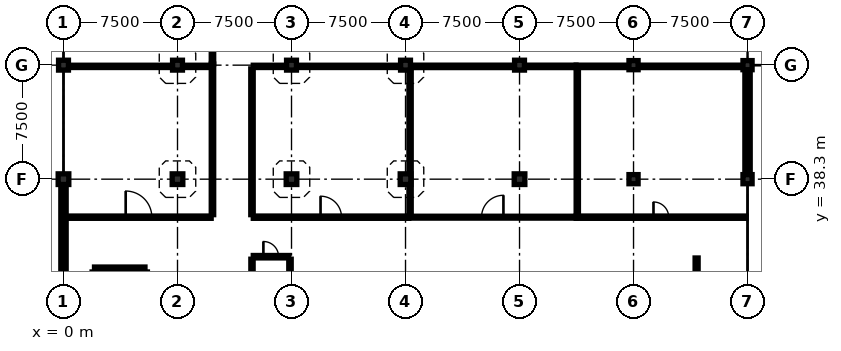
"""IFC4 building model, lengths in metres.
Left out: names, types, materials, properties, quantities, classifications, styles, units other than length and angle.
Written with IfcOpenShell. Run it as: python <this file> out.ifc"""

import sys

from ifc_helpers import new_model, si_unit, direction, frame, frame_2d, origin, origin_2d, place, context, subcontext, project, spatial, rectangle, extrude, element, fill, save


model = new_model("IFC4")
c1 = context("Model", 3, precision=1e-05, world=origin(), true_north=direction((0.0, 1.0)))
c2 = subcontext(c1, "Body", "Model", "MODEL_VIEW")
j1 = project(units=[si_unit("LENGTHUNIT", "METRE"), si_unit("PLANEANGLEUNIT", "RADIAN")], contexts=[c1])
p1 = place(None, origin())
s1 = spatial("IfcSite", under=j1, at=p1, CompositionType="ELEMENT")
p2 = place(p1, origin())
s2 = spatial("IfcBuilding", under=s1, at=p2, CompositionType="ELEMENT")
p3 = place(p2, frame((0.0, 0.0, 5.0)))
s3 = spatial("IfcBuildingStorey", under=s2, at=p3, CompositionType="ELEMENT", Elevation=5.0)
p4 = place(p3, frame((0.0, 38.3, 0.0), z_axis=(0.0, 0.0, 1.0), x_axis=(1.0, 0.0, 0.0)))
e1 = element("IfcColumn", 1, at=p4, inside=s3, PredefinedType="COLUMN", context=c2, shape_type="SweptSolid", body=[
    extrude(rectangle(XDim=0.7, YDim=0.7, at=origin_2d()), origin(), (0.0, 0.0, 1.0), 4.2),
])
p5 = place(p3, frame((0.0, 45.8, 0.0), z_axis=(0.0, 0.0, 1.0), x_axis=(1.0, 0.0, 0.0)))
e2 = element("IfcColumn", 2, at=p5, inside=s3, PredefinedType="COLUMN", context=c2, shape_type="SweptSolid", body=[
    extrude(rectangle(XDim=0.65, YDim=0.65, at=origin_2d()), origin(), (0.0, 0.0, 1.0), 4.2),
])
p6 = place(p3, frame((7.5, 38.3, 0.0), z_axis=(0.0, 0.0, 1.0), x_axis=(1.0, 0.0, 0.0)))
e3 = element("IfcColumn", 3, at=p6, inside=s3, PredefinedType="COLUMN", context=c2, shape_type="SweptSolid", body=[
    extrude(rectangle(XDim=0.7, YDim=0.7, at=origin_2d()), origin(), (0.0, 0.0, 1.0), 4.2),
])
p7 = place(p3, frame((7.5, 45.8, 0.0), z_axis=(0.0, 0.0, 1.0), x_axis=(1.0, 0.0, 0.0)))
e4 = element("IfcColumn", 4, at=p7, inside=s3, PredefinedType="COLUMN", context=c2, shape_type="SweptSolid", body=[
    extrude(rectangle(XDim=0.65, YDim=0.65, at=origin_2d()), origin(), (0.0, 0.0, 1.0), 4.2),
])
p8 = place(p3, frame((15.0, 38.3, 0.0), z_axis=(0.0, 0.0, 1.0), x_axis=(1.0, 0.0, 0.0)))
e5 = element("IfcColumn", 5, at=p8, inside=s3, PredefinedType="COLUMN", context=c2, shape_type="SweptSolid", body=[
    extrude(rectangle(XDim=0.7, YDim=0.7, at=origin_2d()), origin(), (0.0, 0.0, 1.0), 4.2),
])
p9 = place(p3, frame((15.0, 45.8, 0.0), z_axis=(0.0, 0.0, 1.0), x_axis=(1.0, 0.0, 0.0)))
e6 = element("IfcColumn", 6, at=p9, inside=s3, PredefinedType="COLUMN", context=c2, shape_type="SweptSolid", body=[
    extrude(rectangle(XDim=0.65, YDim=0.65, at=origin_2d()), origin(), (0.0, 0.0, 1.0), 4.2),
])
p10 = place(p3, frame((22.5, 38.3, 0.0), z_axis=(0.0, 0.0, 1.0), x_axis=(1.0, 0.0, 0.0)))
e7 = element("IfcColumn", 7, at=p10, inside=s3, PredefinedType="COLUMN", context=c2, shape_type="SweptSolid", body=[
    extrude(rectangle(XDim=0.7, YDim=0.7, at=origin_2d()), origin(), (0.0, 0.0, 1.0), 4.2),
])
p11 = place(p3, frame((22.5, 45.8, 0.0), z_axis=(0.0, 0.0, 1.0), x_axis=(1.0, 0.0, 0.0)))
e8 = element("IfcColumn", 8, at=p11, inside=s3, PredefinedType="COLUMN", context=c2, shape_type="SweptSolid", body=[
    extrude(rectangle(XDim=0.65, YDim=0.65, at=origin_2d()), origin(), (0.0, 0.0, 1.0), 4.2),
])
p12 = place(p3, frame((30.0, 38.3, 0.0), z_axis=(0.0, 0.0, 1.0), x_axis=(1.0, 0.0, 0.0)))
e9 = element("IfcColumn", 9, at=p12, inside=s3, PredefinedType="COLUMN", context=c2, shape_type="SweptSolid", body=[
    extrude(rectangle(XDim=0.7, YDim=0.7, at=origin_2d()), origin(), (0.0, 0.0, 1.0), 4.2),
])
p13 = place(p3, frame((30.0, 45.8, 0.0), z_axis=(0.0, 0.0, 1.0), x_axis=(1.0, 0.0, 0.0)))
e10 = element("IfcColumn", 10, at=p13, inside=s3, PredefinedType="COLUMN", context=c2, shape_type="SweptSolid", body=[
    extrude(rectangle(XDim=0.65, YDim=0.65, at=origin_2d()), origin(), (0.0, 0.0, 1.0), 4.2),
])
for number, where, z_axis, x_axis in (
    (11, (37.5, 38.3, 0.0), (0.0, 0.0, 1.0), (1.0, 0.0, 0.0)),
    (12, (37.5, 45.8, 0.0), (0.0, 0.0, 1.0), (1.0, 0.0, 0.0)),
    (13, (45.0, 38.3, 0.0), (0.0, 0.0, 1.0), (1.0, 0.0, 0.0)),
    (14, (45.0, 45.8, 0.0), (0.0, 0.0, 1.0), (1.0, 0.0, 0.0)),
):
    element("IfcColumn", number, at=place(p3, frame(where, z_axis=z_axis, x_axis=x_axis)), inside=s3, PredefinedType="COLUMN", context=c2, shape_type="SweptSolid", body=[
        extrude(rectangle(XDim=0.6, YDim=0.6, at=origin_2d()), origin(), (0.0, 0.0, 1.0), 4.2),
    ])
p14 = place(p3, frame((45.0, 45.5, 0.0), z_axis=(0.0, 0.0, 1.0), x_axis=(0.0, -1.0, 0.0)))
e15 = element("IfcWall", 15, at=p14, inside=s3, PredefinedType="SOLIDWALL", context=c2, shape_type="SweptSolid", body=[
    extrude(rectangle(XDim=6.9, YDim=0.35, at=frame_2d((3.45, 0.0))), origin(), (0.0, 0.0, 1.0), 3.485),
])
p15 = place(p3, frame((0.0, 31.15, 0.0), z_axis=(0.0, 0.0, 1.0), x_axis=(0.0, 1.0, 0.0)))
e16 = element("IfcWall", 16, at=p15, inside=s3, PredefinedType="SOLIDWALL", context=c2, shape_type="SweptSolid", body=[
    extrude(rectangle(XDim=6.8, YDim=0.35, at=frame_2d((3.4, 0.0))), origin(), (0.0, 0.0, 1.0), 3.535),
])
p16 = place(p3, frame((5.36, 32.36, 0.0), z_axis=(0.0, 0.0, 1.0), x_axis=(-1.0, 0.0, 0.0)))
e17 = element("IfcWall", 17, at=p16, inside=s3, PredefinedType="SHEAR", context=c2, shape_type="SweptSolid", body=[
    extrude(rectangle(XDim=3.32, YDim=0.32, at=frame_2d((1.66, 0.0))), origin(), (0.0, 0.0, 1.0), 4.2),
])
p17 = place(p3, frame((0.187, 35.8, 0.0), z_axis=(0.0, 0.0, 1.0), x_axis=(1.0, 0.0, 0.0)))
e18 = element("IfcWall", 18, at=p17, inside=s3, PredefinedType="PARTITIONING", context=c2, shape_type="SweptSolid", body=[
    extrude(rectangle(XDim=9.528, YDim=0.15, at=frame_2d((4.764, 0.0))), origin(), (0.0, 0.0, 1.0), 3.265),
])
p18 = place(p17, frame((3.904, 0.0, 0.0)))
e19 = element("IfcOpeningElement", 19, at=p18, cuts=e18, PredefinedType="OPENING", context=c2, shape_type="SweptSolid", body=[
    extrude(rectangle(XDim=1.72, YDim=2.34, at=frame_2d((0.86, 1.17))), frame((0.0, 0.087, 0.0), z_axis=(0.0, -1.0, 0.0), x_axis=(1.0, 0.0, 0.0)), (0.0, 0.0, 1.0), 0.174),
])
p19 = place(p3, frame((12.485, 35.8, 0.0), z_axis=(0.0, 0.0, 1.0), x_axis=(1.0, 0.0, 0.0)))
e20 = element("IfcWall", 20, at=p19, inside=s3, PredefinedType="PARTITIONING", context=c2, shape_type="SweptSolid", body=[
    extrude(rectangle(XDim=10.23, YDim=0.15, at=frame_2d((5.115, 0.0))), origin(), (0.0, 0.0, 1.0), 3.265),
])
p20 = place(p19, frame((4.425, 0.0, 0.0)))
e21 = element("IfcOpeningElement", 21, at=p20, cuts=e20, PredefinedType="OPENING", context=c2, shape_type="SweptSolid", body=[
    extrude(rectangle(XDim=1.38, YDim=2.3, at=frame_2d((0.69, 1.15))), frame((0.0, 0.087, 0.0), z_axis=(0.0, -1.0, 0.0), x_axis=(1.0, 0.0, 0.0)), (0.0, 0.0, 1.0), 0.174),
])
p21 = place(p3, frame((22.727, 35.8, 0.0), z_axis=(0.0, 0.0, 1.0), x_axis=(1.0, 0.0, 0.0)))
e22 = element("IfcWall", 22, at=p21, inside=s3, PredefinedType="PARTITIONING", context=c2, shape_type="SweptSolid", body=[
    extrude(rectangle(XDim=10.988, YDim=0.125, at=frame_2d((5.494, 0.0))), origin(), (0.0, 0.0, 1.0), 3.265),
])
p22 = place(p21, frame((4.774, 0.0, 0.0)))
e23 = element("IfcOpeningElement", 23, at=p22, cuts=e22, PredefinedType="OPENING", context=c2, shape_type="SweptSolid", body=[
    extrude(rectangle(XDim=1.44, YDim=2.32, at=frame_2d((0.72, 1.16))), frame((0.0, 0.074, 0.0), z_axis=(0.0, -1.0, 0.0), x_axis=(1.0, 0.0, 0.0)), (0.0, 0.0, 1.0), 0.149),
])
p23 = place(p3, frame((33.727, 35.8, 0.0), z_axis=(0.0, 0.0, 1.0), x_axis=(1.0, 0.0, 0.0)))
e24 = element("IfcWall", 24, at=p23, inside=s3, PredefinedType="PARTITIONING", context=c2, shape_type="SweptSolid", body=[
    extrude(rectangle(XDim=11.171, YDim=0.15, at=frame_2d((5.585, 0.0))), origin(), (0.0, 0.0, 1.0), 3.485),
])
p24 = place(p23, frame((5.085, 0.0, 0.0)))
e25 = element("IfcOpeningElement", 25, at=p24, cuts=e24, PredefinedType="OPENING", context=c2, shape_type="SweptSolid", body=[
    extrude(rectangle(XDim=1.0, YDim=2.15, at=frame_2d((0.5, 1.075))), frame((0.0, 0.087, 0.0), z_axis=(0.0, -1.0, 0.0), x_axis=(1.0, 0.0, 0.0)), (0.0, 0.0, 1.0), 0.174),
])
p25 = place(p3, frame((12.485, 33.2, 0.0), z_axis=(0.0, 0.0, 1.0), x_axis=(1.0, 0.0, 0.0)))
e26 = element("IfcWall", 26, at=p25, inside=s3, PredefinedType="PARTITIONING", context=c2, shape_type="SweptSolid", body=[
    extrude(rectangle(XDim=2.33, YDim=0.16, at=frame_2d((1.165, 0.0))), origin(), (0.0, 0.0, 1.0), 3.265),
])
p26 = place(p25, frame((0.665, 0.0, 0.0)))
e27 = element("IfcOpeningElement", 27, at=p26, cuts=e26, PredefinedType="OPENING", context=c2, shape_type="SweptSolid", body=[
    extrude(rectangle(XDim=1.0, YDim=2.22, at=frame_2d((0.5, 1.11))), frame((0.0, 0.092, 0.0), z_axis=(0.0, -1.0, 0.0), x_axis=(1.0, 0.0, 0.0)), (0.0, 0.0, 1.0), 0.184),
])
p27 = place(p3, frame((41.65, 27.735, 0.0), z_axis=(0.0, 0.0, 1.0), x_axis=(0.0, 1.0, 0.0)))
e28 = element("IfcWall", 28, at=p27, inside=s3, PredefinedType="PARTITIONING", context=c2, shape_type="SweptSolid", body=[
    extrude(rectangle(XDim=5.38, YDim=0.2, at=frame_2d((2.69, 0.0))), origin(), (0.0, 0.0, 1.0), 3.485),
])
p28 = place(p27, frame((1.79, 0.0, 0.0)))
e29 = element("IfcOpeningElement", 29, at=p28, cuts=e28, PredefinedType="OPENING", context=c2, shape_type="SweptSolid", body=[
    extrude(rectangle(XDim=1.8, YDim=2.15, at=frame_2d((0.9, 1.075))), frame((0.0, 0.112, 0.0), z_axis=(0.0, -1.0, 0.0), x_axis=(1.0, 0.0, 0.0)), (0.0, 0.0, 1.0), 0.224),
])
p29 = place(p3, frame((9.8, 45.885, 0.0), z_axis=(0.0, 0.0, 1.0), x_axis=(0.0, 1.0, 0.0)))
e30 = element("IfcWall", 30, at=p29, inside=s3, PredefinedType="PARTITIONING", context=c2, shape_type="SweptSolid", body=[
    extrude(rectangle(XDim=14.43, YDim=0.16, at=frame_2d((7.215, 0.0))), origin(), (0.0, 0.0, 1.0), 3.265),
])
p30 = place(p29, frame((6.675, 0.0, 0.0)))
e31 = element("IfcOpeningElement", 31, at=p30, cuts=e30, PredefinedType="OPENING", context=c2, shape_type="SweptSolid", body=[
    extrude(rectangle(XDim=1.08, YDim=2.18, at=frame_2d((0.54, 1.09))), frame((0.0, 0.092, 0.0), z_axis=(0.0, -1.0, 0.0), x_axis=(1.0, 0.0, 0.0)), (0.0, 0.0, 1.0), 0.184),
])
p31 = place(p3, frame((0.332, 45.72, 0.0), z_axis=(0.0, 0.0, 1.0), x_axis=(1.0, 0.0, 0.0)))
e32 = element("IfcWall", 32, at=p31, inside=s3, PredefinedType="PARTITIONING", context=c2, shape_type="SweptSolid", body=[
    extrude(rectangle(XDim=9.383, YDim=0.15, at=frame_2d((4.691, 0.0))), origin(), (0.0, 0.0, 1.0), 3.265),
])
p32 = place(p3, frame((12.485, 45.72, 0.0), z_axis=(0.0, 0.0, 1.0), x_axis=(1.0, 0.0, 0.0)))
e33 = element("IfcWall", 33, at=p32, inside=s3, PredefinedType="PARTITIONING", context=c2, shape_type="SweptSolid", body=[
    extrude(rectangle(XDim=10.063, YDim=0.15, at=frame_2d((5.031, 0.0))), origin(), (0.0, 0.0, 1.0), 3.265),
])
p33 = place(p3, frame((22.837, 45.72, 0.0), z_axis=(0.0, 0.0, 1.0), x_axis=(1.0, 0.0, 0.0)))
e34 = element("IfcWall", 34, at=p33, inside=s3, PredefinedType="PARTITIONING", context=c2, shape_type="SweptSolid", body=[
    extrude(rectangle(XDim=10.878, YDim=0.16, at=frame_2d((5.439, 0.0))), origin(), (0.0, 0.0, 1.0), 3.265),
])
p34 = place(p3, frame((33.727, 45.72, 0.0), z_axis=(0.0, 0.0, 1.0), x_axis=(1.0, 0.0, 0.0)))
e35 = element("IfcWall", 35, at=p34, inside=s3, PredefinedType="PARTITIONING", context=c2, shape_type="SweptSolid", body=[
    extrude(rectangle(XDim=10.961, YDim=0.16, at=frame_2d((5.48, 0.0))), origin(), (0.0, 0.0, 1.0), 3.485),
])
p35 = place(p3, frame((9.8, 35.965, 0.0), z_axis=(0.0, 0.0, 1.0), x_axis=(0.0, 1.0, 0.0)))
e36 = element("IfcWall", 36, at=p35, inside=s3, PredefinedType="PARTITIONING", context=c2, shape_type="SweptSolid", body=[
    extrude(rectangle(XDim=9.908, YDim=0.16, at=frame_2d((4.954, 0.0))), origin(), (0.0, 0.0, 1.0), 3.265),
])
p36 = place(p3, frame((12.4, 35.965, 0.0), z_axis=(0.0, 0.0, 1.0), x_axis=(0.0, 1.0, 0.0)))
e37 = element("IfcWall", 37, at=p36, inside=s3, PredefinedType="PARTITIONING", context=c2, shape_type="SweptSolid", body=[
    extrude(rectangle(XDim=9.59, YDim=0.16, at=frame_2d((4.795, 0.0))), origin(), (0.0, 0.0, 1.0), 3.265),
])
p37 = place(p3, frame((22.8, 35.875, 0.0), z_axis=(0.0, 0.0, 1.0), x_axis=(0.0, 1.0, 0.0)))
e38 = element("IfcWall", 38, at=p37, inside=s3, PredefinedType="PARTITIONING", context=c2, shape_type="SweptSolid", body=[
    extrude(rectangle(XDim=9.588, YDim=0.15, at=frame_2d((4.794, 0.0))), origin(), (0.0, 0.0, 1.0), 3.265),
])
p38 = place(p3, frame((33.8, 35.887, 0.0), z_axis=(0.0, 0.0, 1.0), x_axis=(0.0, 1.0, 0.0)))
e39 = element("IfcWall", 39, at=p38, inside=s3, PredefinedType="PARTITIONING", context=c2, shape_type="SweptSolid", body=[
    extrude(rectangle(XDim=9.741, YDim=0.15, at=frame_2d((4.871, 0.0))), origin(), (0.0, 0.0, 1.0), 3.485),
])
p39 = place(p3, frame((12.4, 15.965, 0.0), z_axis=(0.0, 0.0, 1.0), x_axis=(0.0, 1.0, 0.0)))
e40 = element("IfcWall", 40, at=p39, inside=s3, PredefinedType="PARTITIONING", context=c2, shape_type="SweptSolid", body=[
    extrude(rectangle(XDim=17.07, YDim=0.15, at=frame_2d((8.535, 0.0))), origin(), (0.0, 0.0, 1.0), 3.265),
])
p40 = place(p3, frame((14.9, 16.132, 0.0), z_axis=(0.0, 0.0, 1.0), x_axis=(0.0, 1.0, 0.0)))
e41 = element("IfcWall", 41, at=p40, inside=s3, PredefinedType="PARTITIONING", context=c2, shape_type="SweptSolid", body=[
    extrude(rectangle(XDim=16.903, YDim=0.16, at=frame_2d((8.451, 0.0))), origin(), (0.0, 0.0, 1.0), 3.265),
])
p41 = place(p18, origin())
e42 = element("IfcDoor", 42, at=p41, inside=s3, OperationType="SINGLE_SWING_LEFT", PredefinedType="DOOR", context=c2, shape_type="SweptSolid", body=[
    extrude(rectangle(XDim=1.72, YDim=2.34, at=frame_2d((0.86, 1.17))), frame((0.0, 0.025, 0.0), z_axis=(0.0, -1.0, 0.0), x_axis=(1.0, 0.0, 0.0)), (0.0, 0.0, 1.0), 0.05),
])
fill(e19, e42)
p42 = place(p20, origin())
e43 = element("IfcDoor", 43, at=p42, inside=s3, OperationType="SINGLE_SWING_LEFT", PredefinedType="DOOR", context=c2, shape_type="SweptSolid", body=[
    extrude(rectangle(XDim=1.38, YDim=2.3, at=frame_2d((0.69, 1.15))), frame((0.0, 0.025, 0.0), z_axis=(0.0, -1.0, 0.0), x_axis=(1.0, 0.0, 0.0)), (0.0, 0.0, 1.0), 0.05),
])
fill(e21, e43)
p43 = place(p22, origin())
e44 = element("IfcDoor", 44, at=p43, inside=s3, OperationType="SINGLE_SWING_RIGHT", PredefinedType="DOOR", context=c2, shape_type="SweptSolid", body=[
    extrude(rectangle(XDim=1.44, YDim=2.32, at=frame_2d((0.72, 1.16))), frame((0.0, 0.025, 0.0), z_axis=(0.0, -1.0, 0.0), x_axis=(1.0, 0.0, 0.0)), (0.0, 0.0, 1.0), 0.05),
])
fill(e23, e44)
p44 = place(p24, origin())
e45 = element("IfcDoor", 45, at=p44, inside=s3, OperationType="SINGLE_SWING_LEFT", PredefinedType="DOOR", context=c2, shape_type="SweptSolid", body=[
    extrude(rectangle(XDim=1.0, YDim=2.15, at=frame_2d((0.5, 1.075))), frame((0.0, 0.025, 0.0), z_axis=(0.0, -1.0, 0.0), x_axis=(1.0, 0.0, 0.0)), (0.0, 0.0, 1.0), 0.05),
])
fill(e25, e45)
p45 = place(p26, origin())
e46 = element("IfcDoor", 46, at=p45, inside=s3, OperationType="SINGLE_SWING_LEFT", PredefinedType="DOOR", context=c2, shape_type="SweptSolid", body=[
    extrude(rectangle(XDim=1.0, YDim=2.22, at=frame_2d((0.5, 1.11))), frame((0.0, 0.025, 0.0), z_axis=(0.0, -1.0, 0.0), x_axis=(1.0, 0.0, 0.0)), (0.0, 0.0, 1.0), 0.05),
])
fill(e27, e46)
save(model, sys.argv[1])
